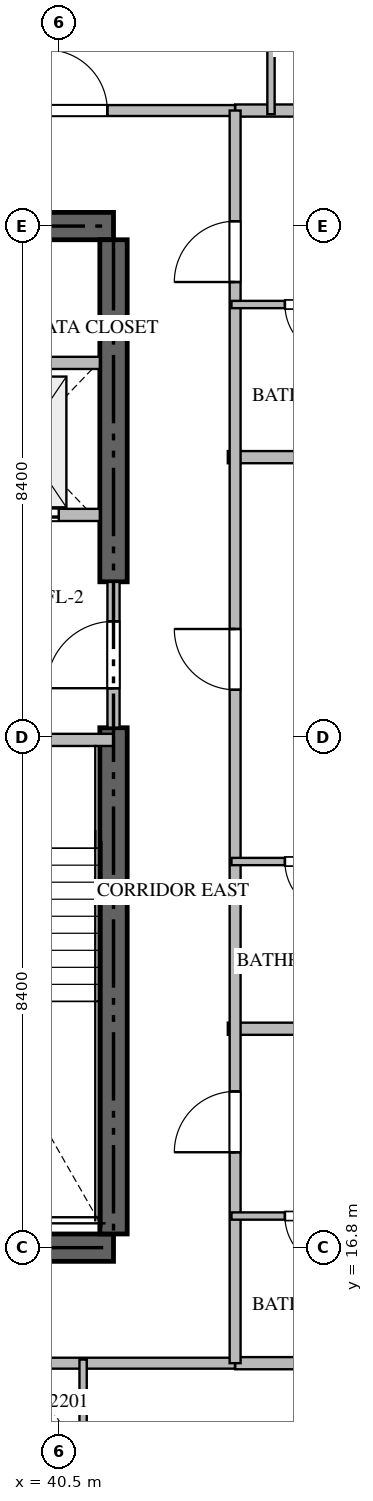
"""IFC4 building model, lengths in metres.
Left out: names, types, materials, properties, quantities, classifications, styles, units other than length and angle.
Written with IfcOpenShell. Run it as: python <this file> out.ifc"""

import sys

from ifc_helpers import new_model, si_unit, direction, frame, frame_2d, origin, place, context, subcontext, project, spatial, rectangle, extrude, source, transform, mapped, element, fill, save


model = new_model("IFC4")
c1 = context("Model", 3, precision=1e-05, world=origin(), true_north=direction((0.0, 1.0)))
c2 = subcontext(c1, "Body", "Model", "MODEL_VIEW")
j1 = project(units=[si_unit("LENGTHUNIT", "METRE"), si_unit("PLANEANGLEUNIT", "RADIAN")], contexts=[c1])
p1 = place(None, origin())
s1 = spatial("IfcSite", under=j1, at=p1, CompositionType="ELEMENT")
p2 = place(p1, origin())
s2 = spatial("IfcBuilding", under=s1, at=p2, CompositionType="ELEMENT")
p3 = place(p2, frame((0.0, 0.0, 90.45)))
s3 = spatial("IfcBuildingStorey", under=s2, at=p3, CompositionType="ELEMENT", Elevation=90.45)
for number, where, z_axis, x_axis in (
    (1, (23.4, 16.8, -0.26), (0.0, 0.0, 1.0), (1.0, 0.0, 0.0)),
    (2, (41.4, 33.6, -0.26), (0.0, 0.0, 1.0), (-1.0, 0.0, 0.0)),
):
    element("IfcWall", number, at=place(p3, frame(where, z_axis=z_axis, x_axis=x_axis)), inside=s3, PredefinedType="SHEAR", context=c2, shape_type="SweptSolid", body=[
        extrude(rectangle(XDim=18.0, YDim=0.45, at=frame_2d((9.0, 0.0))), origin(), (0.0, 0.0, 1.0), 3.748),
    ])
p4 = place(p3, frame((41.4, 17.025, -0.26), z_axis=(0.0, 0.0, 1.0), x_axis=(0.0, 1.0, 0.0)))
e3 = element("IfcWall", 3, at=p4, inside=s3, PredefinedType="SHEAR", context=c2, shape_type="SweptSolid", body=[
    extrude(rectangle(XDim=8.325, YDim=0.45, at=frame_2d((4.163, 0.0))), origin(), (0.0, 0.0, 1.0), 3.748),
])
p5 = place(p3, frame((41.4, 27.75, -0.26), z_axis=(0.0, 0.0, 1.0), x_axis=(0.0, 1.0, 0.0)))
e4 = element("IfcWall", 4, at=p5, inside=s3, PredefinedType="SHEAR", context=c2, shape_type="SweptSolid", body=[
    extrude(rectangle(XDim=5.625, YDim=0.45, at=frame_2d((2.812, 0.0))), origin(), (0.0, 0.0, 1.0), 3.748),
])
p6 = place(p3, frame((36.95, 25.15, 0.0), z_axis=(0.0, 0.0, 1.0), x_axis=(1.0, 0.0, 0.0)))
e5 = element("IfcWall", 5, at=p6, inside=s3, PredefinedType="STANDARD", context=c2, shape_type="SweptSolid", body=[
    extrude(rectangle(XDim=4.45, YDim=0.2, at=frame_2d((2.225, 0.0))), origin(), (0.0, 0.0, 1.0), 3.49),
])
p7 = place(p6, frame((1.65, 0.0, 0.0)))
e6 = element("IfcOpeningElement", 6, at=p7, cuts=e5, PredefinedType="OPENING", context=c2, shape_type="SweptSolid", body=[
    extrude(rectangle(XDim=1.1, YDim=2.15, at=frame_2d((0.55, 1.075))), frame((0.0, 0.11, 0.0), z_axis=(0.0, -1.0, 0.0), x_axis=(1.0, 0.0, 0.0)), (0.0, 0.0, 1.0), 0.22),
])
p8 = place(p3, frame((38.75, 28.85, 0.0), z_axis=(0.0, 0.0, 1.0), x_axis=(1.0, 0.0, 0.0)))
e7 = element("IfcWall", 7, at=p8, inside=s3, PredefinedType="STANDARD", context=c2, shape_type="SweptSolid", body=[
    extrude(rectangle(XDim=2.425, YDim=0.2, at=frame_2d((1.212, 0.0))), origin(), (0.0, 0.0, 1.0), 3.49),
])
p9 = place(p8, frame((0.55, 0.0, 0.0)))
e8 = element("IfcOpeningElement", 8, at=p9, cuts=e7, PredefinedType="OPENING", context=c2, shape_type="SweptSolid", body=[
    extrude(rectangle(XDim=1.2, YDim=2.2, at=frame_2d((0.6, 1.1))), frame((0.0, 0.11, 0.0), z_axis=(0.0, -1.0, 0.0), x_axis=(1.0, 0.0, 0.0)), (0.0, 0.0, 1.0), 0.22),
])
p10 = place(p3, frame((38.75, 31.35, 0.0), z_axis=(0.0, 0.0, 1.0), x_axis=(1.0, 0.0, 0.0)))
e9 = element("IfcWall", 9, at=p10, inside=s3, PredefinedType="STANDARD", context=c2, shape_type="SweptSolid", body=[
    extrude(rectangle(XDim=2.425, YDim=0.2, at=frame_2d((1.212, 0.0))), origin(), (0.0, 0.0, 1.0), 3.49),
])
p11 = place(p3, frame((41.4, 25.352, 0.0), z_axis=(0.0, 0.0, 1.0), x_axis=(0.0, 1.0, 0.0)))
e10 = element("IfcWall", 10, at=p11, inside=s3, PredefinedType="STANDARD", context=c2, shape_type="SweptSolid", body=[
    extrude(rectangle(XDim=2.396, YDim=0.2, at=frame_2d((1.198, 0.0))), origin(), (0.0, 0.0, 1.0), 3.49),
])
p12 = place(p11, frame((0.648, 0.0, 0.0)))
e11 = element("IfcOpeningElement", 11, at=p12, cuts=e10, PredefinedType="OPENING", context=c2, shape_type="SweptSolid", body=[
    extrude(rectangle(XDim=1.1, YDim=2.15, at=frame_2d((0.55, 1.075))), frame((0.0, 0.11, 0.0), z_axis=(0.0, -1.0, 0.0), x_axis=(1.0, 0.0, 0.0)), (0.0, 0.0, 1.0), 0.22),
])
for number, where, z_axis, x_axis in (
    (12, (43.28, 20.4, 0.0), (0.0, 0.0, 1.0), (1.0, 0.0, 0.0)),
    (13, (43.28, 29.8, 0.0), (0.0, 0.0, 1.0), (1.0, 0.0, 0.0)),
):
    element("IfcWall", number, at=place(p3, frame(where, z_axis=z_axis, x_axis=x_axis)), inside=s3, PredefinedType="PARTITIONING", context=c2, shape_type="SweptSolid", body=[
        extrude(rectangle(XDim=15.438, YDim=0.2, at=frame_2d((7.719, 0.0))), origin(), (0.0, 0.0, 1.0), 3.49),
    ])
for number, where, z_axis, x_axis in (
    (14, (43.4, 14.9, 0.0), (0.0, 0.0, 1.0), (1.0, 0.0, 0.0)),
    (15, (43.4, 35.5, 0.0), (0.0, 0.0, 1.0), (1.0, 0.0, 0.0)),
):
    element("IfcWall", number, at=place(p3, frame(where, z_axis=z_axis, x_axis=x_axis)), inside=s3, PredefinedType="PARTITIONING", context=c2, shape_type="SweptSolid", body=[
        extrude(rectangle(XDim=15.318, YDim=0.2, at=frame_2d((7.659, 0.0))), origin(), (0.0, 0.0, 1.0), 3.49),
    ])
p13 = place(p3, frame((21.402, 14.9, 0.0), z_axis=(0.0, 0.0, 1.0), x_axis=(1.0, 0.0, 0.0)))
e16 = element("IfcWall", 16, at=p13, inside=s3, PredefinedType="PARTITIONING", context=c2, shape_type="SweptSolid", body=[
    extrude(rectangle(XDim=21.996, YDim=0.18, at=frame_2d((10.998, 0.0))), origin(), (0.0, 0.0, 1.0), 3.49),
])
p14 = place(p13, frame((7.202, 0.0, 0.0)))
e17 = element("IfcOpeningElement", 17, at=p14, cuts=e16, PredefinedType="OPENING", context=c2, shape_type="SweptSolid", body=[
    extrude(rectangle(XDim=1.0, YDim=2.15, at=frame_2d((0.5, 1.075))), frame((0.0, 0.1, 0.0), z_axis=(0.0, -1.0, 0.0), x_axis=(1.0, 0.0, 0.0)), (0.0, 0.0, 1.0), 0.2),
])
p15 = place(p3, frame((21.402, 35.5, 0.0), z_axis=(0.0, 0.0, 1.0), x_axis=(1.0, 0.0, 0.0)))
e18 = element("IfcWall", 18, at=p15, inside=s3, PredefinedType="PARTITIONING", context=c2, shape_type="SweptSolid", body=[
    extrude(rectangle(XDim=21.996, YDim=0.18, at=frame_2d((10.998, 0.0))), origin(), (0.0, 0.0, 1.0), 3.49),
])
p16 = place(p15, frame((1.96, 0.0, 0.0)))
e19 = element("IfcOpeningElement", 19, at=p16, cuts=e18, PredefinedType="OPENING", context=c2, shape_type="SweptSolid", body=[
    extrude(rectangle(XDim=1.0, YDim=2.15, at=frame_2d((0.5, 1.075))), frame((0.0, 0.1, 0.0), z_axis=(0.0, -1.0, 0.0), x_axis=(1.0, 0.0, 0.0)), (0.0, 0.0, 1.0), 0.2),
])
p17 = place(p15, frame((5.249, 0.0, 0.0)))
e20 = element("IfcOpeningElement", 20, at=p17, cuts=e18, PredefinedType="OPENING", context=c2, shape_type="SweptSolid", body=[
    extrude(rectangle(XDim=1.0, YDim=2.15, at=frame_2d((0.5, 1.075))), frame((0.0, 0.1, 0.0), z_axis=(0.0, -1.0, 0.0), x_axis=(1.0, 0.0, 0.0)), (0.0, 0.0, 1.0), 0.2),
])
p18 = place(p15, frame((11.653, 0.0, 0.0)))
e21 = element("IfcOpeningElement", 21, at=p18, cuts=e18, PredefinedType="OPENING", context=c2, shape_type="SweptSolid", body=[
    extrude(rectangle(XDim=1.0, YDim=2.15, at=frame_2d((0.5, 1.075))), frame((0.0, 0.1, 0.0), z_axis=(0.0, -1.0, 0.0), x_axis=(1.0, 0.0, 0.0)), (0.0, 0.0, 1.0), 0.2),
])
p19 = place(p15, frame((18.896, 0.0, 0.0)))
e22 = element("IfcOpeningElement", 22, at=p19, cuts=e18, PredefinedType="OPENING", context=c2, shape_type="SweptSolid", body=[
    extrude(rectangle(XDim=1.0, YDim=2.15, at=frame_2d((0.5, 1.075))), frame((0.0, 0.1, 0.0), z_axis=(0.0, -1.0, 0.0), x_axis=(1.0, 0.0, 0.0)), (0.0, 0.0, 1.0), 0.2),
])
p20 = place(p3, frame((43.4, 14.9, 0.0), z_axis=(0.0, 0.0, 1.0), x_axis=(0.0, 1.0, 0.0)))
e23 = element("IfcWall", 23, at=p20, inside=s3, PredefinedType="PARTITIONING", context=c2, shape_type="SweptSolid", body=[
    extrude(rectangle(XDim=20.6, YDim=0.18, at=frame_2d((10.3, 0.0))), origin(), (0.0, 0.0, 1.0), 3.49),
])
p21 = place(p20, frame((3.469, 0.0, 0.0)))
e24 = element("IfcOpeningElement", 24, at=p21, cuts=e23, PredefinedType="OPENING", context=c2, shape_type="SweptSolid", body=[
    extrude(rectangle(XDim=1.0, YDim=2.15, at=frame_2d((0.5, 1.075))), frame((0.0, 0.1, 0.0), z_axis=(0.0, -1.0, 0.0), x_axis=(1.0, 0.0, 0.0)), (0.0, 0.0, 1.0), 0.2),
])
p22 = place(p20, frame((11.074, 0.0, 0.0)))
e25 = element("IfcOpeningElement", 25, at=p22, cuts=e23, PredefinedType="OPENING", context=c2, shape_type="SweptSolid", body=[
    extrude(rectangle(XDim=1.0, YDim=2.15, at=frame_2d((0.5, 1.075))), frame((0.0, 0.1, 0.0), z_axis=(0.0, -1.0, 0.0), x_axis=(1.0, 0.0, 0.0)), (0.0, 0.0, 1.0), 0.2),
])
p23 = place(p20, frame((17.78, 0.0, 0.0)))
e26 = element("IfcOpeningElement", 26, at=p23, cuts=e23, PredefinedType="OPENING", context=c2, shape_type="SweptSolid", body=[
    extrude(rectangle(XDim=1.0, YDim=2.15, at=frame_2d((0.5, 1.075))), frame((0.0, 0.1, 0.0), z_axis=(0.0, -1.0, 0.0), x_axis=(1.0, 0.0, 0.0)), (0.0, 0.0, 1.0), 0.2),
])
p24 = place(p3, frame((40.9, 12.752, 0.0), z_axis=(0.0, 0.0, 1.0), x_axis=(0.0, 1.0, 0.0)))
e27 = element("IfcWall", 27, at=p24, inside=s3, PredefinedType="PARTITIONING", context=c2, shape_type="SweptSolid", body=[
    extrude(rectangle(XDim=2.208, YDim=0.12, at=frame_2d((1.104, 0.0))), origin(), (0.0, 0.0, 1.0), 3.49),
])
p25 = place(p3, frame((43.99, 38.25, 0.0), z_axis=(0.0, 0.0, 1.0), x_axis=(0.0, -1.0, 0.0)))
e28 = element("IfcWall", 28, at=p25, inside=s3, PredefinedType="PARTITIONING", context=c2, shape_type="SweptSolid", body=[
    extrude(rectangle(XDim=2.81, YDim=0.12, at=frame_2d((1.405, 0.0))), origin(), (0.0, 0.0, 1.0), 3.49),
])
p26 = place(p3, frame((45.948, 17.32, 0.0), z_axis=(0.0, 0.0, 1.0), x_axis=(-1.0, 0.0, 0.0)))
e29 = element("IfcWall", 29, at=p26, inside=s3, PredefinedType="PARTITIONING", context=c2, shape_type="SweptSolid", body=[
    extrude(rectangle(XDim=2.608, YDim=0.12, at=frame_2d((1.304, 0.0))), origin(), (0.0, 0.0, 1.0), 3.49),
])
p27 = place(p26, frame((0.879, 0.0, 0.0)))
e30 = element("IfcOpeningElement", 30, at=p27, cuts=e29, PredefinedType="OPENING", context=c2, shape_type="SweptSolid", body=[
    extrude(rectangle(XDim=0.85, YDim=2.1, at=frame_2d((0.425, 1.05))), frame((0.0, 0.07, 0.0), z_axis=(0.0, -1.0, 0.0), x_axis=(1.0, 0.0, 0.0)), (0.0, 0.0, 1.0), 0.14),
])
p28 = place(p3, frame((45.948, 23.15, 0.0), z_axis=(0.0, 0.0, 1.0), x_axis=(-1.0, 0.0, 0.0)))
e31 = element("IfcWall", 31, at=p28, inside=s3, PredefinedType="PARTITIONING", context=c2, shape_type="SweptSolid", body=[
    extrude(rectangle(XDim=2.608, YDim=0.12, at=frame_2d((1.304, 0.0))), origin(), (0.0, 0.0, 1.0), 3.49),
])
p29 = place(p28, frame((0.879, 0.0, 0.0)))
e32 = element("IfcOpeningElement", 32, at=p29, cuts=e31, PredefinedType="OPENING", context=c2, shape_type="SweptSolid", body=[
    extrude(rectangle(XDim=0.85, YDim=2.1, at=frame_2d((0.425, 1.05))), frame((0.0, 0.07, 0.0), z_axis=(0.0, -1.0, 0.0), x_axis=(1.0, 0.0, 0.0)), (0.0, 0.0, 1.0), 0.14),
])
p30 = place(p3, frame((45.948, 32.31, 0.0), z_axis=(0.0, 0.0, 1.0), x_axis=(-1.0, 0.0, 0.0)))
e33 = element("IfcWall", 33, at=p30, inside=s3, PredefinedType="PARTITIONING", context=c2, shape_type="SweptSolid", body=[
    extrude(rectangle(XDim=2.608, YDim=0.12, at=frame_2d((1.304, 0.0))), origin(), (0.0, 0.0, 1.0), 3.49),
])
p31 = place(p30, frame((0.879, 0.0, 0.0)))
e34 = element("IfcOpeningElement", 34, at=p31, cuts=e33, PredefinedType="OPENING", context=c2, shape_type="SweptSolid", body=[
    extrude(rectangle(XDim=0.85, YDim=2.1, at=frame_2d((0.425, 1.05))), frame((0.0, 0.07, 0.0), z_axis=(0.0, -1.0, 0.0), x_axis=(1.0, 0.0, 0.0)), (0.0, 0.0, 1.0), 0.14),
])
m1 = source(origin(), c2, "Body", "SweptSolid", [
    extrude(rectangle(XDim=1.2, YDim=2.2, at=frame_2d((0.6, 1.1))), frame((0.0, 0.025, 0.0), z_axis=(0.0, -1.0, 0.0), x_axis=(1.0, 0.0, 0.0)), (0.0, 0.0, 1.0), 0.05),
])
p32 = place(p9, origin())
e35 = element("IfcDoor", 35, at=p32, inside=s3, OperationType="DOUBLE_DOOR_SLIDING", PredefinedType="DOOR", context=c2, shape_type="MappedRepresentation", body=[
    mapped(m1, transform((0.0, 0.0, 0.0), scale=1.0)),
])
fill(e8, e35)
m2 = source(origin(), c2, "Body", "SweptSolid", [
    extrude(rectangle(XDim=1.1, YDim=2.15, at=frame_2d((0.55, 1.075))), frame((0.0, 0.025, 0.0), z_axis=(0.0, -1.0, 0.0), x_axis=(1.0, 0.0, 0.0)), (0.0, 0.0, 1.0), 0.05),
])
p33 = place(p12, origin())
e36 = element("IfcDoor", 36, at=p33, inside=s3, OperationType="SINGLE_SWING_LEFT", PredefinedType="DOOR", context=c2, shape_type="MappedRepresentation", body=[
    mapped(m2, transform((0.0, 0.0, 0.0), scale=1.0)),
])
fill(e11, e36)
m3 = source(origin(), c2, "Body", "SweptSolid", [
    extrude(rectangle(XDim=1.0, YDim=2.15, at=frame_2d((0.5, 1.075))), frame((0.0, 0.025, 0.0), z_axis=(0.0, -1.0, 0.0), x_axis=(1.0, 0.0, 0.0)), (0.0, 0.0, 1.0), 0.05),
])
p34 = place(p19, origin())
e37 = element("IfcDoor", 37, at=p34, inside=s3, OperationType="SINGLE_SWING_LEFT", PredefinedType="DOOR", context=c2, shape_type="MappedRepresentation", body=[
    mapped(m3, transform((0.0, 0.0, 0.0), scale=1.0)),
])
fill(e22, e37)
p35 = place(p21, origin())
e38 = element("IfcDoor", 38, at=p35, inside=s3, OperationType="SINGLE_SWING_LEFT", PredefinedType="DOOR", context=c2, shape_type="MappedRepresentation", body=[
    mapped(m3, transform((0.0, 0.0, 0.0), scale=1.0)),
])
fill(e24, e38)
p36 = place(p22, origin())
e39 = element("IfcDoor", 39, at=p36, inside=s3, OperationType="SINGLE_SWING_RIGHT", PredefinedType="DOOR", context=c2, shape_type="MappedRepresentation", body=[
    mapped(m3, transform((0.0, 0.0, 0.0), scale=1.0)),
])
fill(e25, e39)
p37 = place(p23, origin())
e40 = element("IfcDoor", 40, at=p37, inside=s3, OperationType="SINGLE_SWING_LEFT", PredefinedType="DOOR", context=c2, shape_type="MappedRepresentation", body=[
    mapped(m3, transform((0.0, 0.0, 0.0), scale=1.0)),
])
fill(e26, e40)
m4 = source(origin(), c2, "Body", "SweptSolid", [
    extrude(rectangle(XDim=0.85, YDim=2.1, at=frame_2d((0.425, 1.05))), frame((0.0, 0.025, 0.0), z_axis=(0.0, -1.0, 0.0), x_axis=(1.0, 0.0, 0.0)), (0.0, 0.0, 1.0), 0.05),
])
p38 = place(p27, origin())
e41 = element("IfcDoor", 41, at=p38, inside=s3, OperationType="SINGLE_SWING_LEFT", PredefinedType="DOOR", context=c2, shape_type="MappedRepresentation", body=[
    mapped(m4, transform((0.0, 0.0, 0.0), scale=1.0)),
])
fill(e30, e41)
p39 = place(p29, origin())
e42 = element("IfcDoor", 42, at=p39, inside=s3, OperationType="SINGLE_SWING_LEFT", PredefinedType="DOOR", context=c2, shape_type="MappedRepresentation", body=[
    mapped(m4, transform((0.0, 0.0, 0.0), scale=1.0)),
])
fill(e32, e42)
p40 = place(p31, origin())
e43 = element("IfcDoor", 43, at=p40, inside=s3, OperationType="SINGLE_SWING_LEFT", PredefinedType="DOOR", context=c2, shape_type="MappedRepresentation", body=[
    mapped(m4, transform((0.0, 0.0, 0.0), scale=1.0)),
])
fill(e34, e43)
save(model, sys.argv[1])
